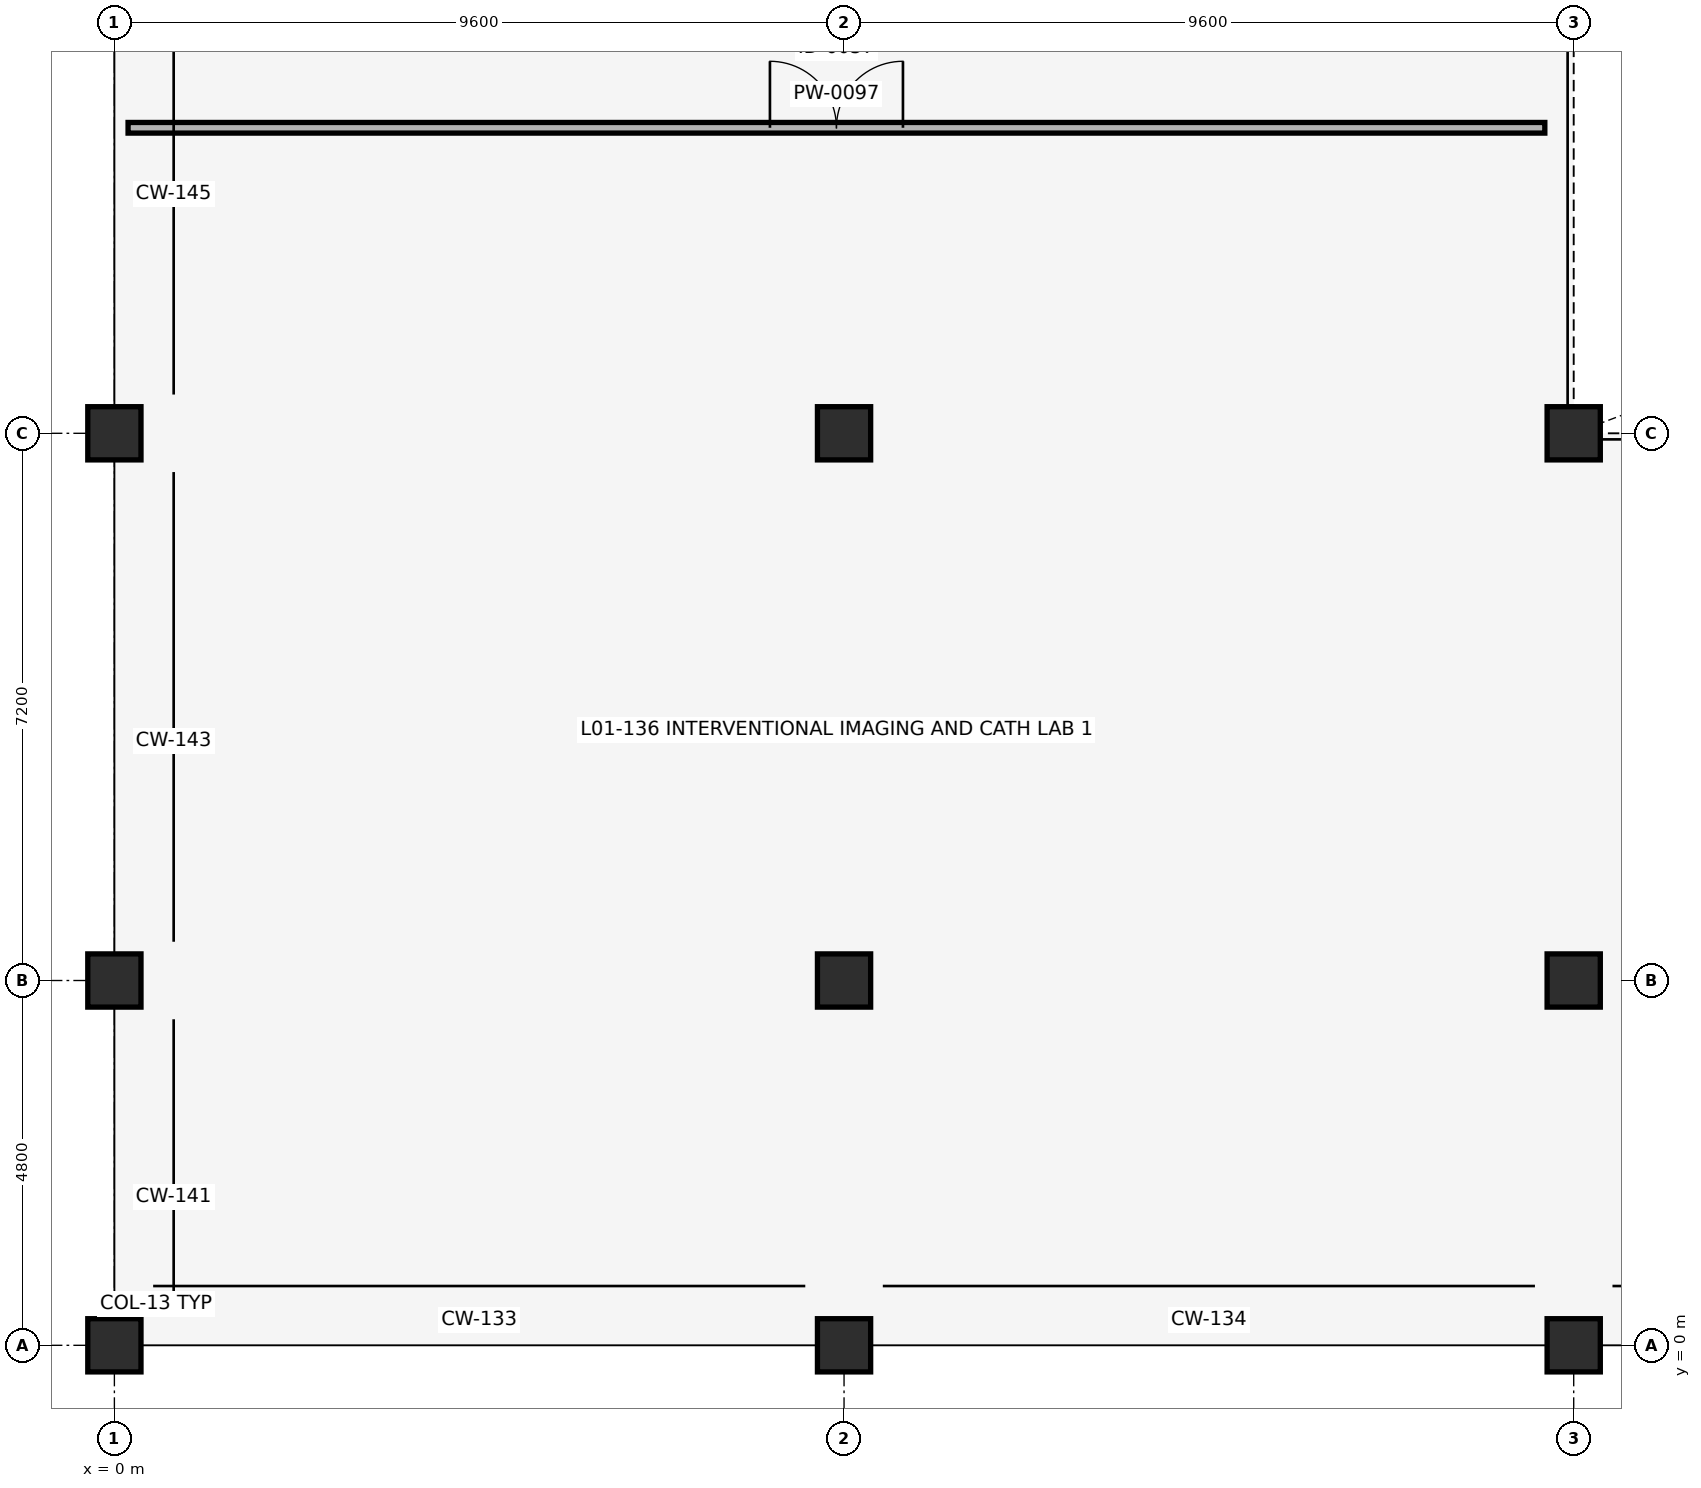
"""IFC4 building model, lengths in metres.
Left out: names, types, materials, properties, quantities, classifications, styles, units other than length and angle.
Written with IfcOpenShell. Run it as: python <this file> out.ifc"""

import sys

from ifc_helpers import new_model, si_unit, direction, frame, frame_2d, origin, origin_2d, place, context, subcontext, project, spatial, rectangle, circle, extrude, element, fill, save


model = new_model("IFC4")
c1 = context("Model", 3, precision=1e-05, world=origin(), true_north=direction((0.0, 1.0)))
c2 = subcontext(c1, "Body", "Model", "MODEL_VIEW")
j1 = project(units=[si_unit("LENGTHUNIT", "METRE"), si_unit("PLANEANGLEUNIT", "RADIAN")], contexts=[c1])
p1 = place(None, origin())
s1 = spatial("IfcSite", under=j1, at=p1, CompositionType="ELEMENT")
p2 = place(p1, origin())
s2 = spatial("IfcBuilding", under=s1, at=p2, CompositionType="ELEMENT")
p3 = place(p2, frame((0.0, 0.0, 4.42)))
s3 = spatial("IfcBuildingStorey", under=s2, at=p3, CompositionType="ELEMENT", Elevation=4.42)
for number, where, z_axis, x_axis in (
    (1, (0.0, 0.0, 0.0), (0.0, 0.0, 1.0), (1.0, 0.0, 0.0)),
    (2, (0.0, 4.8, 0.0), (0.0, 0.0, 1.0), (1.0, 0.0, 0.0)),
    (3, (0.0, 12.0, 0.0), (0.0, 0.0, 1.0), (1.0, 0.0, 0.0)),
    (4, (9.6, 0.0, 0.0), (0.0, 0.0, 1.0), (1.0, 0.0, 0.0)),
    (5, (9.6, 4.8, 0.0), (0.0, 0.0, 1.0), (1.0, 0.0, 0.0)),
    (6, (9.6, 12.0, 0.0), (0.0, 0.0, 1.0), (1.0, 0.0, 0.0)),
    (7, (19.2, 0.0, 0.0), (0.0, 0.0, 1.0), (1.0, 0.0, 0.0)),
    (8, (19.2, 4.8, 0.0), (0.0, 0.0, 1.0), (1.0, 0.0, 0.0)),
    (9, (19.2, 12.0, 0.0), (0.0, 0.0, 1.0), (1.0, 0.0, 0.0)),
):
    element("IfcColumn", number, at=place(p3, frame(where, z_axis=z_axis, x_axis=x_axis)), inside=s3, PredefinedType="COLUMN", context=c2, shape_type="SweptSolid", body=[
        extrude(circle(Radius=0.35, at=origin_2d()), origin(), (0.0, 0.0, 1.0), 4.08),
    ])
p4 = place(p3, frame((0.18, 16.02, 0.0), z_axis=(0.0, 0.0, 1.0), x_axis=(1.0, 0.0, 0.0)))
e10 = element("IfcWall", 10, at=p4, inside=s3, PredefinedType="PARTITIONING", context=c2, shape_type="SweptSolid", body=[
    extrude(rectangle(XDim=18.64, YDim=0.14, at=frame_2d((9.32, 0.0))), origin(), (0.0, 0.0, 1.0), 3.05),
])
p5 = place(p4, frame((8.445, 0.0, 0.0)))
e11 = element("IfcOpeningElement", 11, at=p5, cuts=e10, PredefinedType="OPENING", context=c2, shape_type="SweptSolid", body=[
    extrude(rectangle(XDim=1.75, YDim=2.15, at=frame_2d((0.875, 1.075))), frame((0.0, 0.08, 0.0), z_axis=(0.0, -1.0, 0.0), x_axis=(1.0, 0.0, 0.0)), (0.0, 0.0, 1.0), 0.16),
])
p6 = place(p5, origin())
e12 = element("IfcDoor", 12, at=p6, inside=s3, OperationType="DOUBLE_DOOR_SINGLE_SWING", PredefinedType="DOOR", context=c2, shape_type="SweptSolid", body=[
    extrude(rectangle(XDim=1.75, YDim=2.15, at=frame_2d((0.875, 1.075))), frame((0.0, 0.025, 0.0), z_axis=(0.0, -1.0, 0.0), x_axis=(1.0, 0.0, 0.0)), (0.0, 0.0, 1.0), 0.05),
])
fill(e11, e12)
save(model, sys.argv[1])
